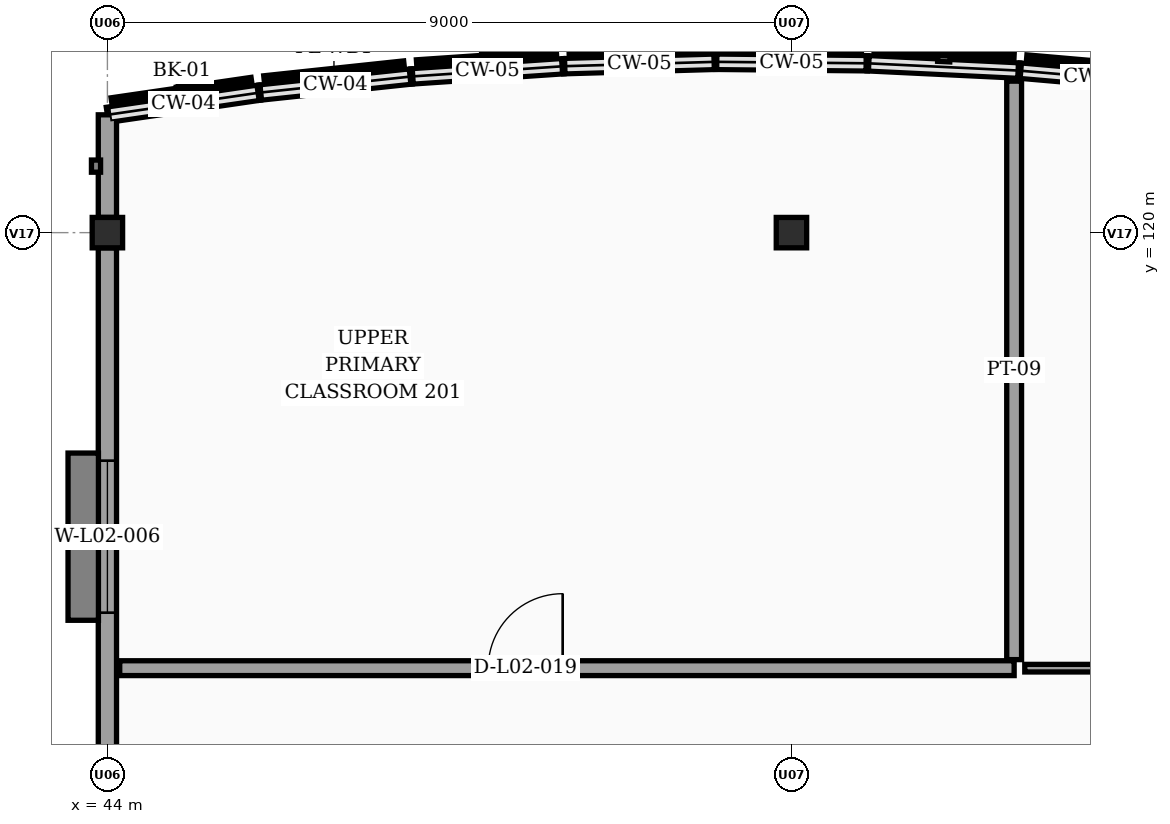
"""IFC4 building model, lengths in metres.
Left out: names, types, materials, properties, quantities, classifications, styles, units other than length and angle.
Written with IfcOpenShell. Run it as: python <this file> out.ifc"""

import sys

from ifc_helpers import new_model, si_unit, direction, frame, frame_2d, origin, origin_2d, place, context, subcontext, project, spatial, rectangle, extrude, element, fill, save


model = new_model("IFC4")
c1 = context("Model", 3, precision=1e-05, world=origin(), true_north=direction((0.0, 1.0)))
c2 = subcontext(c1, "Body", "Model", "MODEL_VIEW")
j1 = project(units=[si_unit("LENGTHUNIT", "METRE"), si_unit("PLANEANGLEUNIT", "RADIAN")], contexts=[c1])
p1 = place(None, origin())
s1 = spatial("IfcSite", under=j1, at=p1, CompositionType="ELEMENT")
p2 = place(p1, origin())
s2 = spatial("IfcBuilding", under=s1, at=p2, CompositionType="ELEMENT")
p3 = place(p2, frame((0.0, 0.0, 8.4)))
s3 = spatial("IfcBuildingStorey", under=s2, at=p3, CompositionType="ELEMENT", Elevation=8.4)
for number, where, z_axis, x_axis in (
    (1, (44.0, 120.0, 0.0), (0.0, 0.0, 1.0), (1.0, 0.0, 0.0)),
    (2, (53.0, 120.0, 0.0), (0.0, 0.0, 1.0), (1.0, 0.0, 0.0)),
):
    element("IfcColumn", number, at=place(p3, frame(where, z_axis=z_axis, x_axis=x_axis)), inside=s3, PredefinedType="COLUMN", context=c2, shape_type="SweptSolid", body=[
        extrude(rectangle(XDim=0.4, YDim=0.4, at=origin_2d()), origin(), (0.0, 0.0, 1.0), 3.9),
    ])
p4 = place(p3, frame((44.0, 121.55, 0.0), z_axis=(0.0, 0.0, 1.0), x_axis=(0.989544477223, 0.144228040259, 0.0)))
e3 = element("IfcWall", 3, at=p4, inside=s3, PredefinedType="SOLIDWALL", context=c2, shape_type="SweptSolid", body=[
    extrude(rectangle(XDim=2.021, YDim=0.2, at=frame_2d((1.011, 0.0))), origin(), (0.0, 0.0, 1.0), 0.95),
])
p5 = place(p3, frame((46.0, 121.842, 0.0), z_axis=(0.0, 0.0, 1.0), x_axis=(0.994395160059, 0.105727317433, 0.0)))
e4 = element("IfcWall", 4, at=p5, inside=s3, PredefinedType="SOLIDWALL", context=c2, shape_type="SweptSolid", body=[
    extrude(rectangle(XDim=2.011, YDim=0.2, at=frame_2d((1.006, 0.0))), origin(), (0.0, 0.0, 1.0), 0.95),
])
p6 = place(p3, frame((48.0, 122.054, 0.0), z_axis=(0.0, 0.0, 1.0), x_axis=(0.997729302978, 0.067351599676, 0.0)))
e5 = element("IfcWall", 5, at=p6, inside=s3, PredefinedType="SOLIDWALL", context=c2, shape_type="SweptSolid", body=[
    extrude(rectangle(XDim=2.005, YDim=0.2, at=frame_2d((1.002, 0.0))), origin(), (0.0, 0.0, 1.0), 0.95),
])
p7 = place(p3, frame((50.0, 122.189, 0.0), z_axis=(0.0, 0.0, 1.0), x_axis=(0.999581770858, 0.028918564416, 0.0)))
e6 = element("IfcWall", 6, at=p7, inside=s3, PredefinedType="SOLIDWALL", context=c2, shape_type="SweptSolid", body=[
    extrude(rectangle(XDim=2.001, YDim=0.2, at=frame_2d((1.0, 0.0))), origin(), (0.0, 0.0, 1.0), 0.95),
])
p8 = place(p3, frame((52.0, 122.247, 0.0), z_axis=(0.0, 0.0, 1.0), x_axis=(0.999953504169, -0.009643106302, 0.0)))
e7 = element("IfcWall", 7, at=p8, inside=s3, PredefinedType="SOLIDWALL", context=c2, shape_type="SweptSolid", body=[
    extrude(rectangle(XDim=2.0, YDim=0.2, at=frame_2d((1.0, 0.0))), origin(), (0.0, 0.0, 1.0), 0.95),
])
p9 = place(p3, frame((54.0, 122.228, 0.0), z_axis=(0.0, 0.0, 1.0), x_axis=(0.99884540439, -0.048040172037, 0.0)))
e8 = element("IfcWall", 8, at=p9, inside=s3, PredefinedType="SOLIDWALL", context=c2, shape_type="SweptSolid", body=[
    extrude(rectangle(XDim=2.002, YDim=0.2, at=frame_2d((1.001, 0.0))), origin(), (0.0, 0.0, 1.0), 0.95),
])
p10 = place(p3, frame((56.0, 122.132, 0.0), z_axis=(0.0, 0.0, 1.0), x_axis=(0.996244237948, -0.086587633962, 0.0)))
e9 = element("IfcWall", 9, at=p10, inside=s3, PredefinedType="SOLIDWALL", context=c2, shape_type="SweptSolid", body=[
    extrude(rectangle(XDim=2.008, YDim=0.2, at=frame_2d((1.004, 0.0))), origin(), (0.0, 0.0, 1.0), 0.95),
])
p11 = place(p3, frame((44.0, 112.2, 0.0), z_axis=(0.0, 0.0, 1.0), x_axis=(0.0, 1.0, 0.0)))
e10 = element("IfcWall", 10, at=p11, inside=s3, PredefinedType="SOLIDWALL", context=c2, shape_type="SweptSolid", body=[
    extrude(rectangle(XDim=7.6, YDim=0.24, at=frame_2d((3.8, 0.0))), origin(), (0.0, 0.0, 1.0), 3.29),
])
p12 = place(p11, frame((2.8, 0.0, 0.95)))
e11 = element("IfcOpeningElement", 11, at=p12, cuts=e10, PredefinedType="OPENING", context=c2, shape_type="SweptSolid", body=[
    extrude(rectangle(XDim=2.0, YDim=1.5, at=frame_2d((1.0, 0.75))), frame((0.0, 0.13, 0.0), z_axis=(0.0, -1.0, 0.0), x_axis=(1.0, 0.0, 0.0)), (0.0, 0.0, 1.0), 0.26),
])
p13 = place(p3, frame((44.0, 120.2, 0.0), z_axis=(0.0, 0.0, 1.0), x_axis=(0.0, 1.0, 0.0)))
e12 = element("IfcWall", 12, at=p13, inside=s3, PredefinedType="SOLIDWALL", context=c2, shape_type="SweptSolid", body=[
    extrude(rectangle(XDim=1.35, YDim=0.24, at=frame_2d((0.675, 0.0))), origin(), (0.0, 0.0, 1.0), 3.29),
])
p14 = place(p3, frame((44.162, 114.27, 0.0), z_axis=(0.0, 0.0, 1.0), x_axis=(1.0, 0.0, 0.0)))
e13 = element("IfcWall", 13, at=p14, inside=s3, PredefinedType="PARTITIONING", context=c2, shape_type="SweptSolid", body=[
    extrude(rectangle(XDim=11.768, YDim=0.195, at=frame_2d((5.884, 0.0))), origin(), (0.0, 0.0, 1.0), 3.65),
])
p15 = place(p14, frame((4.848, 0.0, 0.0)))
e14 = element("IfcOpeningElement", 14, at=p15, cuts=e13, PredefinedType="OPENING", context=c2, shape_type="SweptSolid", body=[
    extrude(rectangle(XDim=0.98, YDim=2.1, at=frame_2d((0.49, 1.05))), frame((0.0, 0.107, 0.0), z_axis=(0.0, -1.0, 0.0), x_axis=(1.0, 0.0, 0.0)), (0.0, 0.0, 1.0), 0.215),
])
p16 = place(p3, frame((55.93, 114.383, 0.0), z_axis=(0.0, 0.0, 1.0), x_axis=(0.0, 1.0, 0.0)))
e15 = element("IfcWall", 15, at=p16, inside=s3, PredefinedType="PARTITIONING", context=c2, shape_type="SweptSolid", body=[
    extrude(rectangle(XDim=7.61, YDim=0.195, at=frame_2d((3.805, 0.0))), origin(), (0.0, 0.0, 1.0), 3.65),
])
p17 = place(p3, frame((56.07, 114.27, 0.0), z_axis=(0.0, 0.0, 1.0), x_axis=(1.0, 0.0, 0.0)))
e16 = element("IfcWall", 16, at=p17, inside=s3, PredefinedType="PARTITIONING", context=c2, shape_type="SweptSolid", body=[
    extrude(rectangle(XDim=8.86, YDim=0.1, at=frame_2d((4.43, 0.0))), origin(), (0.0, 0.0, 1.0), 3.65),
])
p18 = place(p17, frame((3.92, 0.0, 0.0)))
e17 = element("IfcOpeningElement", 17, at=p18, cuts=e16, PredefinedType="OPENING", context=c2, shape_type="SweptSolid", body=[
    extrude(rectangle(XDim=1.02, YDim=2.1, at=frame_2d((0.51, 1.05))), frame((0.0, 0.06, 0.0), z_axis=(0.0, -1.0, 0.0), x_axis=(1.0, 0.0, 0.0)), (0.0, 0.0, 1.0), 0.12),
])
p19 = place(p12, origin())
e18 = element("IfcWindow", 18, at=p19, inside=s3, PartitioningType="DOUBLE_PANEL_VERTICAL", PredefinedType="WINDOW", context=c2, shape_type="SweptSolid", body=[
    extrude(rectangle(XDim=2.0, YDim=1.5, at=frame_2d((1.0, 0.75))), frame((0.0, 0.03, 0.0), z_axis=(0.0, -1.0, 0.0), x_axis=(1.0, 0.0, 0.0)), (0.0, 0.0, 1.0), 0.06),
])
fill(e11, e18)
p20 = place(p15, origin())
e19 = element("IfcDoor", 19, at=p20, inside=s3, OperationType="SINGLE_SWING_RIGHT", PredefinedType="DOOR", context=c2, shape_type="SweptSolid", body=[
    extrude(rectangle(XDim=0.98, YDim=2.1, at=frame_2d((0.49, 1.05))), frame((0.0, 0.025, 0.0), z_axis=(0.0, -1.0, 0.0), x_axis=(1.0, 0.0, 0.0)), (0.0, 0.0, 1.0), 0.05),
])
fill(e14, e19)
save(model, sys.argv[1])
